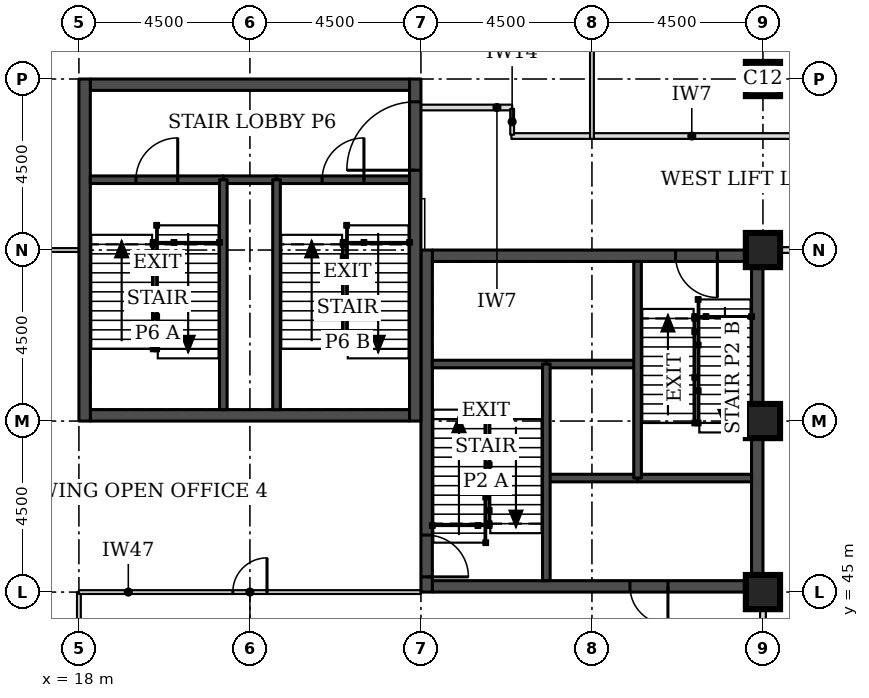
"""IFC4 building model, lengths in metres.
Left out: names, types, materials, properties, quantities, classifications, styles, units other than length and angle.
Written with IfcOpenShell. Run it as: python <this file> out.ifc"""

import sys

from ifc_helpers import new_model, si_unit, direction, frame, frame_2d, origin, origin_2d, place, context, subcontext, project, spatial, rectangle, extrude, element, fill, save


model = new_model("IFC4")
c1 = context("Model", 3, precision=1e-05, world=origin(), true_north=direction((0.0, 1.0)))
c2 = subcontext(c1, "Body", "Model", "MODEL_VIEW")
j1 = project(units=[si_unit("LENGTHUNIT", "METRE"), si_unit("PLANEANGLEUNIT", "RADIAN")], contexts=[c1])
p1 = place(None, origin())
s1 = spatial("IfcSite", under=j1, at=p1, CompositionType="ELEMENT")
p2 = place(p1, origin())
s2 = spatial("IfcBuilding", under=s1, at=p2, CompositionType="ELEMENT")
p3 = place(p2, frame((0.0, 0.0, 181.0)))
s3 = spatial("IfcBuildingStorey", under=s2, at=p3, CompositionType="ELEMENT", Elevation=181.0)
for number, where, z_axis, x_axis in (
    (1, (36.0, 45.0, 0.0), (0.0, 0.0, 1.0), (1.0, 0.0, 0.0)),
    (2, (36.0, 49.5, 0.0), (0.0, 0.0, 1.0), (1.0, 0.0, 0.0)),
    (3, (36.0, 54.0, 0.0), (0.0, 0.0, 1.0), (1.0, 0.0, 0.0)),
    (4, (36.0, 58.5, 0.0), (0.0, 0.0, 1.0), (1.0, 0.0, 0.0)),
):
    element("IfcColumn", number, at=place(p3, frame(where, z_axis=z_axis, x_axis=x_axis)), inside=s3, PredefinedType="COLUMN", context=c2, shape_type="SweptSolid", body=[
        extrude(rectangle(XDim=0.9, YDim=0.9, at=origin_2d()), origin(), (0.0, 0.0, 1.0), 3.7),
    ])
p4 = place(p3, frame((27.3, 45.15, 0.0), z_axis=(0.0, 0.0, 1.0), x_axis=(1.0, 0.0, 0.0)))
e5 = element("IfcWall", 5, at=p4, inside=s3, PredefinedType="SHEAR", context=c2, shape_type="SweptSolid", body=[
    extrude(rectangle(XDim=8.4, YDim=0.3, at=frame_2d((4.2, 0.0))), origin(), (0.0, 0.0, 1.0), 3.7),
])
p5 = place(p4, frame((5.2, 0.0, 0.0)))
e6 = element("IfcOpeningElement", 6, at=p5, cuts=e5, PredefinedType="OPENING", context=c2, shape_type="SweptSolid", body=[
    extrude(rectangle(XDim=1.0, YDim=2.1, at=frame_2d((0.5, 1.05))), frame((0.0, 0.16, 0.0), z_axis=(0.0, -1.0, 0.0), x_axis=(1.0, 0.0, 0.0)), (0.0, 0.0, 1.0), 0.32),
])
p6 = place(p3, frame((27.3, 53.85, 0.0), z_axis=(0.0, 0.0, 1.0), x_axis=(1.0, 0.0, 0.0)))
e7 = element("IfcWall", 7, at=p6, inside=s3, PredefinedType="SHEAR", context=c2, shape_type="SweptSolid", body=[
    extrude(rectangle(XDim=8.4, YDim=0.3, at=frame_2d((4.2, 0.0))), origin(), (0.0, 0.0, 1.0), 3.7),
])
p7 = place(p6, frame((6.4, 0.0, 0.0)))
e8 = element("IfcOpeningElement", 8, at=p7, cuts=e7, PredefinedType="OPENING", context=c2, shape_type="SweptSolid", body=[
    extrude(rectangle(XDim=1.1, YDim=2.1, at=frame_2d((0.55, 1.05))), frame((0.0, 0.16, 0.0), z_axis=(0.0, -1.0, 0.0), x_axis=(1.0, 0.0, 0.0)), (0.0, 0.0, 1.0), 0.32),
])
p8 = place(p3, frame((27.15, 45.0, 0.0), z_axis=(0.0, 0.0, 1.0), x_axis=(0.0, 1.0, 0.0)))
e9 = element("IfcWall", 9, at=p8, inside=s3, PredefinedType="SHEAR", context=c2, shape_type="SweptSolid", body=[
    extrude(rectangle(XDim=9.0, YDim=0.3, at=frame_2d((4.5, 0.0))), origin(), (0.0, 0.0, 1.0), 3.7),
])
p9 = place(p8, frame((0.4, 0.0, 0.0)))
e10 = element("IfcOpeningElement", 10, at=p9, cuts=e9, PredefinedType="OPENING", context=c2, shape_type="SweptSolid", body=[
    extrude(rectangle(XDim=1.1, YDim=2.1, at=frame_2d((0.55, 1.05))), frame((0.0, 0.16, 0.0), z_axis=(0.0, -1.0, 0.0), x_axis=(1.0, 0.0, 0.0)), (0.0, 0.0, 1.0), 0.32),
])
p10 = place(p3, frame((35.85, 45.0, 0.0), z_axis=(0.0, 0.0, 1.0), x_axis=(0.0, 1.0, 0.0)))
e11 = element("IfcWall", 11, at=p10, inside=s3, PredefinedType="SHEAR", context=c2, shape_type="SweptSolid", body=[
    extrude(rectangle(XDim=9.0, YDim=0.3, at=frame_2d((4.5, 0.0))), origin(), (0.0, 0.0, 1.0), 3.7),
])
for number, where, z_axis, x_axis in (
    (12, (18.3, 49.65, 0.0), (0.0, 0.0, 1.0), (1.0, 0.0, 0.0)),
    (13, (18.3, 58.35, 0.0), (0.0, 0.0, 1.0), (1.0, 0.0, 0.0)),
):
    element("IfcWall", number, at=place(p3, frame(where, z_axis=z_axis, x_axis=x_axis)), inside=s3, PredefinedType="SHEAR", context=c2, shape_type="SweptSolid", body=[
        extrude(rectangle(XDim=8.4, YDim=0.3, at=frame_2d((4.2, 0.0))), origin(), (0.0, 0.0, 1.0), 3.7),
    ])
p11 = place(p3, frame((18.15, 49.5, 0.0), z_axis=(0.0, 0.0, 1.0), x_axis=(0.0, 1.0, 0.0)))
e14 = element("IfcWall", 14, at=p11, inside=s3, PredefinedType="SHEAR", context=c2, shape_type="SweptSolid", body=[
    extrude(rectangle(XDim=9.0, YDim=0.3, at=frame_2d((4.5, 0.0))), origin(), (0.0, 0.0, 1.0), 3.7),
])
p12 = place(p3, frame((26.85, 49.5, 0.0), z_axis=(0.0, 0.0, 1.0), x_axis=(0.0, 1.0, 0.0)))
e15 = element("IfcWall", 15, at=p12, inside=s3, PredefinedType="SHEAR", context=c2, shape_type="SweptSolid", body=[
    extrude(rectangle(XDim=9.0, YDim=0.3, at=frame_2d((4.5, 0.0))), origin(), (0.0, 0.0, 1.0), 3.7),
])
p13 = place(p12, frame((6.6, 0.0, 0.0)))
e16 = element("IfcOpeningElement", 16, at=p13, cuts=e15, PredefinedType="OPENING", context=c2, shape_type="SweptSolid", body=[
    extrude(rectangle(XDim=1.8, YDim=2.1, at=frame_2d((0.9, 1.05))), frame((0.0, 0.16, 0.0), z_axis=(0.0, -1.0, 0.0), x_axis=(1.0, 0.0, 0.0)), (0.0, 0.0, 1.0), 0.32),
])
p14 = place(p3, frame((17.792, 63.676, 0.0), z_axis=(0.0, 0.0, 1.0), x_axis=(-0.707106781187, -0.707106781187, 0.0)))
e17 = element("IfcWall", 17, at=p14, inside=s3, PredefinedType="STANDARD", context=c2, shape_type="SweptSolid", body=[
    extrude(rectangle(XDim=7.027, YDim=0.35, at=frame_2d((3.513, 0.0))), origin(), (0.0, 0.0, 1.0), 3.525),
])
p15 = place(p14, frame((1.863, 0.0, 0.9)))
e18 = element("IfcOpeningElement", 18, at=p15, cuts=e17, PredefinedType="OPENING", context=c2, shape_type="SweptSolid", body=[
    extrude(rectangle(XDim=3.3, YDim=1.9, at=frame_2d((1.65, 0.95))), frame((0.0, 0.185, 0.0), z_axis=(0.0, -1.0, 0.0), x_axis=(1.0, 0.0, 0.0)), (0.0, 0.0, 1.0), 0.37),
])
p16 = place(p3, frame((12.824, 44.792, 0.0), z_axis=(0.0, 0.0, 1.0), x_axis=(0.707106781187, -0.707106781187, 0.0)))
e19 = element("IfcWall", 19, at=p16, inside=s3, PredefinedType="STANDARD", context=c2, shape_type="SweptSolid", body=[
    extrude(rectangle(XDim=7.027, YDim=0.35, at=frame_2d((3.513, 0.0))), origin(), (0.0, 0.0, 1.0), 3.525),
])
p17 = place(p16, frame((1.863, 0.0, 0.9)))
e20 = element("IfcOpeningElement", 20, at=p17, cuts=e19, PredefinedType="OPENING", context=c2, shape_type="SweptSolid", body=[
    extrude(rectangle(XDim=3.3, YDim=1.9, at=frame_2d((1.65, 0.95))), frame((0.0, 0.185, 0.0), z_axis=(0.0, -1.0, 0.0), x_axis=(1.0, 0.0, 0.0)), (0.0, 0.0, 1.0), 0.37),
])
p18 = place(p3, frame((36.45, 54.0, 0.0), z_axis=(0.0, 0.0, 1.0), x_axis=(1.0, 0.0, 0.0)))
e21 = element("IfcWall", 21, at=p18, inside=s3, PredefinedType="PARTITIONING", context=c2, shape_type="SweptSolid", body=[
    extrude(rectangle(XDim=5.625, YDim=0.15, at=frame_2d((2.812, 0.0))), origin(), (0.0, 0.0, 1.0), 3.55),
])
p19 = place(p3, frame((29.38, 57.0, 0.0), z_axis=(0.0, 0.0, 1.0), x_axis=(1.0, 0.0, 0.0)))
e22 = element("IfcWall", 22, at=p19, inside=s3, PredefinedType="PARTITIONING", context=c2, shape_type="SweptSolid", body=[
    extrude(rectangle(XDim=12.695, YDim=0.15, at=frame_2d((6.348, 0.0))), origin(), (0.0, 0.0, 1.0), 3.55),
])
p20 = place(p3, frame((36.0, 40.95, 0.0), z_axis=(0.0, 0.0, 1.0), x_axis=(0.0, 1.0, 0.0)))
e23 = element("IfcWall", 23, at=p20, inside=s3, PredefinedType="PARTITIONING", context=c2, shape_type="SweptSolid", body=[
    extrude(rectangle(XDim=3.63, YDim=0.15, at=frame_2d((1.815, 0.0))), origin(), (0.0, 0.0, 1.0), 2.8),
])
p21 = place(p20, frame((1.4, 0.0, 0.0)))
e24 = element("IfcOpeningElement", 24, at=p21, cuts=e23, PredefinedType="OPENING", context=c2, shape_type="SweptSolid", body=[
    extrude(rectangle(XDim=0.9, YDim=2.1, at=frame_2d((0.45, 1.05))), frame((0.0, 0.085, 0.0), z_axis=(0.0, -1.0, 0.0), x_axis=(1.0, 0.0, 0.0)), (0.0, 0.0, 1.0), 0.17),
])
p22 = place(p3, frame((31.5, 63.0, 0.0), z_axis=(0.0, 0.0, 1.0), x_axis=(0.0, -1.0, 0.0)))
e25 = element("IfcWall", 25, at=p22, inside=s3, PredefinedType="PARTITIONING", context=c2, shape_type="SweptSolid", body=[
    extrude(rectangle(XDim=6.075, YDim=0.1, at=frame_2d((3.038, 0.0))), origin(), (0.0, 0.0, 1.0), 3.55),
])
p23 = place(p22, frame((2.588, 0.0, 0.0)))
e26 = element("IfcOpeningElement", 26, at=p23, cuts=e25, PredefinedType="OPENING", context=c2, shape_type="SweptSolid", body=[
    extrude(rectangle(XDim=0.9, YDim=2.1, at=frame_2d((0.45, 1.05))), frame((0.0, 0.06, 0.0), z_axis=(0.0, -1.0, 0.0), x_axis=(1.0, 0.0, 0.0)), (0.0, 0.0, 1.0), 0.12),
])
p24 = place(p3, frame((13.5, 54.0, 0.0), z_axis=(0.0, 0.0, 1.0), x_axis=(1.0, 0.0, 0.0)))
e27 = element("IfcWall", 27, at=p24, inside=s3, PredefinedType="PARTITIONING", context=c2, shape_type="SweptSolid", body=[
    extrude(rectangle(XDim=4.5, YDim=0.1, at=frame_2d((2.25, 0.0))), origin(), (0.0, 0.0, 1.0), 3.55),
])
p25 = place(p24, frame((1.8, 0.0, 0.0)))
e28 = element("IfcOpeningElement", 28, at=p25, cuts=e27, PredefinedType="OPENING", context=c2, shape_type="SweptSolid", body=[
    extrude(rectangle(XDim=0.9, YDim=2.1, at=frame_2d((0.45, 1.05))), frame((0.0, 0.06, 0.0), z_axis=(0.0, -1.0, 0.0), x_axis=(1.0, 0.0, 0.0)), (0.0, 0.0, 1.0), 0.12),
])
p26 = place(p3, frame((18.0, 40.5, 0.0), z_axis=(0.0, 0.0, 1.0), x_axis=(0.0, 1.0, 0.0)))
e29 = element("IfcWall", 29, at=p26, inside=s3, PredefinedType="PARTITIONING", context=c2, shape_type="SweptSolid", body=[
    extrude(rectangle(XDim=4.5, YDim=0.1, at=frame_2d((2.25, 0.0))), origin(), (0.0, 0.0, 1.0), 3.55),
])
p27 = place(p3, frame((18.0, 45.0, 0.0), z_axis=(0.0, 0.0, 1.0), x_axis=(1.0, 0.0, 0.0)))
e30 = element("IfcWall", 30, at=p27, inside=s3, PredefinedType="PARTITIONING", context=c2, shape_type="SweptSolid", body=[
    extrude(rectangle(XDim=9.0, YDim=0.1, at=frame_2d((4.5, 0.0))), origin(), (0.0, 0.0, 1.0), 2.55),
])
p28 = place(p27, frame((4.05, 0.0, 0.0)))
e31 = element("IfcOpeningElement", 31, at=p28, cuts=e30, PredefinedType="OPENING", context=c2, shape_type="SweptSolid", body=[
    extrude(rectangle(XDim=0.9, YDim=2.1, at=frame_2d((0.45, 1.05))), frame((0.0, 0.06, 0.0), z_axis=(0.0, -1.0, 0.0), x_axis=(1.0, 0.0, 0.0)), (0.0, 0.0, 1.0), 0.12),
])
p29 = place(p3, frame((27.0, 57.75, 0.0), z_axis=(0.0, 0.0, 1.0), x_axis=(1.0, 0.0, 0.0)))
e32 = element("IfcWall", 32, at=p29, inside=s3, PredefinedType="PARTITIONING", context=c2, shape_type="SweptSolid", body=[
    extrude(rectangle(XDim=2.4, YDim=0.15, at=frame_2d((1.2, 0.0))), origin(), (0.0, 0.0, 1.0), 3.55),
])
p30 = place(p3, frame((29.4, 57.715, 0.0), z_axis=(0.0, 0.0, 1.0), x_axis=(0.0, -1.0, 0.0)))
e33 = element("IfcWall", 33, at=p30, inside=s3, PredefinedType="PARTITIONING", context=c2, shape_type="SweptSolid", body=[
    extrude(rectangle(XDim=0.68, YDim=0.1, at=frame_2d((0.34, 0.0))), origin(), (0.0, 0.0, 1.0), 3.55),
])
p31 = place(p3, frame((30.3, 48.0, 0.0), z_axis=(0.0, 0.0, 1.0), x_axis=(1.0, 0.0, 0.0)))
e34 = element("IfcWall", 34, at=p31, inside=s3, PredefinedType="SOLIDWALL", context=c2, shape_type="SweptSolid", body=[
    extrude(rectangle(XDim=2.4, YDim=0.2, at=frame_2d((1.2, 0.0))), origin(), (0.0, 0.0, 1.0), 3.55),
])
p32 = place(p3, frame((32.7, 48.0, 0.0), z_axis=(0.0, 0.0, 1.0), x_axis=(1.0, 0.0, 0.0)))
e35 = element("IfcWall", 35, at=p32, inside=s3, PredefinedType="SOLIDWALL", context=c2, shape_type="SweptSolid", body=[
    extrude(rectangle(XDim=3.0, YDim=0.2, at=frame_2d((1.5, 0.0))), origin(), (0.0, 0.0, 1.0), 3.55),
])
p33 = place(p3, frame((30.3, 51.0, 0.0), z_axis=(0.0, 0.0, 1.0), x_axis=(1.0, 0.0, 0.0)))
e36 = element("IfcWall", 36, at=p33, inside=s3, PredefinedType="SOLIDWALL", context=c2, shape_type="SweptSolid", body=[
    extrude(rectangle(XDim=2.4, YDim=0.2, at=frame_2d((1.2, 0.0))), origin(), (0.0, 0.0, 1.0), 3.7),
])
p34 = place(p3, frame((27.3, 51.0, 0.0), z_axis=(0.0, 0.0, 1.0), x_axis=(1.0, 0.0, 0.0)))
e37 = element("IfcWall", 37, at=p34, inside=s3, PredefinedType="SOLIDWALL", context=c2, shape_type="SweptSolid", body=[
    extrude(rectangle(XDim=3.0, YDim=0.2, at=frame_2d((1.5, 0.0))), origin(), (0.0, 0.0, 1.0), 3.55),
])
for number, where, z_axis, x_axis in (
    (38, (30.3, 45.3, 0.0), (0.0, 0.0, 1.0), (0.0, 1.0, 0.0)),
    (39, (32.7, 48.0, 0.0), (0.0, 0.0, 1.0), (0.0, 1.0, 0.0)),
):
    element("IfcWall", number, at=place(p3, frame(where, z_axis=z_axis, x_axis=x_axis)), inside=s3, PredefinedType="SOLIDWALL", context=c2, shape_type="SweptSolid", body=[
        extrude(rectangle(XDim=5.7, YDim=0.2, at=frame_2d((2.85, 0.0))), origin(), (0.0, 0.0, 1.0), 3.55),
    ])
p35 = place(p3, frame((21.8, 55.85, 0.0), z_axis=(0.0, 0.0, 1.0), x_axis=(1.0, 0.0, 0.0)))
e40 = element("IfcWall", 40, at=p35, inside=s3, PredefinedType="SOLIDWALL", context=c2, shape_type="SweptSolid", body=[
    extrude(rectangle(XDim=1.4, YDim=0.2, at=frame_2d((0.7, 0.0))), origin(), (0.0, 0.0, 1.0), 3.55),
])
p36 = place(p3, frame((18.3, 55.85, 0.0), z_axis=(0.0, 0.0, 1.0), x_axis=(1.0, 0.0, 0.0)))
e41 = element("IfcWall", 41, at=p36, inside=s3, PredefinedType="SOLIDWALL", context=c2, shape_type="SweptSolid", body=[
    extrude(rectangle(XDim=3.5, YDim=0.2, at=frame_2d((1.75, 0.0))), origin(), (0.0, 0.0, 1.0), 3.55),
])
p37 = place(p36, frame((1.2, 0.0, 0.0)))
e42 = element("IfcOpeningElement", 42, at=p37, cuts=e41, PredefinedType="OPENING", context=c2, shape_type="SweptSolid", body=[
    extrude(rectangle(XDim=1.1, YDim=2.1, at=frame_2d((0.55, 1.05))), frame((0.0, 0.11, 0.0), z_axis=(0.0, -1.0, 0.0), x_axis=(1.0, 0.0, 0.0)), (0.0, 0.0, 1.0), 0.22),
])
p38 = place(p3, frame((23.2, 55.85, 0.0), z_axis=(0.0, 0.0, 1.0), x_axis=(1.0, 0.0, 0.0)))
e43 = element("IfcWall", 43, at=p38, inside=s3, PredefinedType="SOLIDWALL", context=c2, shape_type="SweptSolid", body=[
    extrude(rectangle(XDim=3.5, YDim=0.2, at=frame_2d((1.75, 0.0))), origin(), (0.0, 0.0, 1.0), 3.55),
])
p39 = place(p38, frame((1.2, 0.0, 0.0)))
e44 = element("IfcOpeningElement", 44, at=p39, cuts=e43, PredefinedType="OPENING", context=c2, shape_type="SweptSolid", body=[
    extrude(rectangle(XDim=1.1, YDim=2.1, at=frame_2d((0.55, 1.05))), frame((0.0, 0.11, 0.0), z_axis=(0.0, -1.0, 0.0), x_axis=(1.0, 0.0, 0.0)), (0.0, 0.0, 1.0), 0.22),
])
for number, where, z_axis, x_axis in (
    (45, (21.8, 49.8, 0.0), (0.0, 0.0, 1.0), (0.0, 1.0, 0.0)),
    (46, (23.2, 49.8, 0.0), (0.0, 0.0, 1.0), (0.0, 1.0, 0.0)),
):
    element("IfcWall", number, at=place(p3, frame(where, z_axis=z_axis, x_axis=x_axis)), inside=s3, PredefinedType="SOLIDWALL", context=c2, shape_type="SweptSolid", body=[
        extrude(rectangle(XDim=6.05, YDim=0.2, at=frame_2d((3.025, 0.0))), origin(), (0.0, 0.0, 1.0), 3.55),
    ])
p40 = place(p28, origin())
e47 = element("IfcDoor", 47, at=p40, inside=s3, OperationType="SINGLE_SWING_RIGHT", PredefinedType="DOOR", context=c2, shape_type="SweptSolid", body=[
    extrude(rectangle(XDim=0.9, YDim=2.1, at=frame_2d((0.45, 1.05))), frame((0.0, 0.025, 0.0), z_axis=(0.0, -1.0, 0.0), x_axis=(1.0, 0.0, 0.0)), (0.0, 0.0, 1.0), 0.05),
])
fill(e31, e47)
p41 = place(p9, frame((1.1, 0.0, 0.0), z_axis=(0.0, 0.0, 1.0), x_axis=(-1.0, 0.0, 0.0)))
e48 = element("IfcDoor", 48, at=p41, inside=s3, OperationType="SINGLE_SWING_RIGHT", PredefinedType="DOOR", context=c2, shape_type="SweptSolid", body=[
    extrude(rectangle(XDim=1.1, YDim=2.1, at=frame_2d((0.55, 1.05))), frame((0.0, 0.025, 0.0), z_axis=(0.0, -1.0, 0.0), x_axis=(1.0, 0.0, 0.0)), (0.0, 0.0, 1.0), 0.05),
])
fill(e10, e48)
p42 = place(p7, frame((1.1, 0.0, 0.0), z_axis=(0.0, 0.0, 1.0), x_axis=(-1.0, 0.0, 0.0)))
e49 = element("IfcDoor", 49, at=p42, inside=s3, OperationType="SINGLE_SWING_LEFT", PredefinedType="DOOR", context=c2, shape_type="SweptSolid", body=[
    extrude(rectangle(XDim=1.1, YDim=2.1, at=frame_2d((0.55, 1.05))), frame((0.0, 0.025, 0.0), z_axis=(0.0, -1.0, 0.0), x_axis=(1.0, 0.0, 0.0)), (0.0, 0.0, 1.0), 0.05),
])
fill(e8, e49)
p43 = place(p5, frame((1.0, 0.0, 0.0), z_axis=(0.0, 0.0, 1.0), x_axis=(-1.0, 0.0, 0.0)))
e50 = element("IfcDoor", 50, at=p43, inside=s3, OperationType="SINGLE_SWING_LEFT", PredefinedType="DOOR", context=c2, shape_type="SweptSolid", body=[
    extrude(rectangle(XDim=1.0, YDim=2.1, at=frame_2d((0.5, 1.05))), frame((0.0, 0.025, 0.0), z_axis=(0.0, -1.0, 0.0), x_axis=(1.0, 0.0, 0.0)), (0.0, 0.0, 1.0), 0.05),
])
fill(e6, e50)
p44 = place(p37, origin())
e51 = element("IfcDoor", 51, at=p44, inside=s3, OperationType="SINGLE_SWING_RIGHT", PredefinedType="DOOR", context=c2, shape_type="SweptSolid", body=[
    extrude(rectangle(XDim=1.1, YDim=2.1, at=frame_2d((0.55, 1.05))), frame((0.0, 0.025, 0.0), z_axis=(0.0, -1.0, 0.0), x_axis=(1.0, 0.0, 0.0)), (0.0, 0.0, 1.0), 0.05),
])
fill(e42, e51)
p45 = place(p39, origin())
e52 = element("IfcDoor", 52, at=p45, inside=s3, OperationType="SINGLE_SWING_RIGHT", PredefinedType="DOOR", context=c2, shape_type="SweptSolid", body=[
    extrude(rectangle(XDim=1.1, YDim=2.1, at=frame_2d((0.55, 1.05))), frame((0.0, 0.025, 0.0), z_axis=(0.0, -1.0, 0.0), x_axis=(1.0, 0.0, 0.0)), (0.0, 0.0, 1.0), 0.05),
])
fill(e44, e52)
p46 = place(p13, origin())
e53 = element("IfcDoor", 53, at=p46, inside=s3, OperationType="SINGLE_SWING_LEFT", PredefinedType="DOOR", context=c2, shape_type="SweptSolid", body=[
    extrude(rectangle(XDim=1.8, YDim=2.1, at=frame_2d((0.9, 1.05))), frame((0.0, 0.025, 0.0), z_axis=(0.0, -1.0, 0.0), x_axis=(1.0, 0.0, 0.0)), (0.0, 0.0, 1.0), 0.05),
])
fill(e16, e53)
save(model, sys.argv[1])
